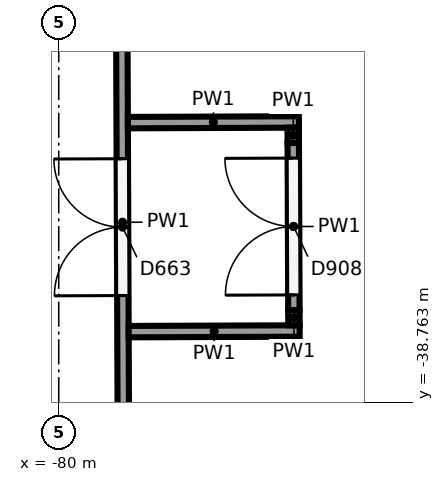
"""IFC4 building model, lengths in metres.
Left out: names, types, materials, properties, quantities, classifications, styles, units other than length and angle.
Written with IfcOpenShell. Run it as: python <this file> out.ifc"""

import sys

from ifc_helpers import new_model, si_unit, direction, frame, frame_2d, origin, place, context, subcontext, project, spatial, rectangle, extrude, element, fill, save


model = new_model("IFC4")
c1 = context("Model", 3, precision=1e-05, world=origin(), true_north=direction((0.0, 1.0)))
c2 = subcontext(c1, "Body", "Model", "MODEL_VIEW")
j1 = project(units=[si_unit("LENGTHUNIT", "METRE"), si_unit("PLANEANGLEUNIT", "RADIAN")], contexts=[c1])
p1 = place(None, origin())
s1 = spatial("IfcSite", under=j1, at=p1, CompositionType="ELEMENT")
p2 = place(p1, origin())
s2 = spatial("IfcBuilding", under=s1, at=p2, CompositionType="ELEMENT")
p3 = place(p2, frame((0.0, 0.0, 6.5)))
s3 = spatial("IfcBuildingStorey", under=s2, at=p3, CompositionType="ELEMENT", Elevation=6.5)
p4 = place(p3, frame((-79.14, -41.81, 0.0), z_axis=(0.0, 0.0, 1.0), x_axis=(-0.003787424647, 0.999992827682, 0.0)))
e1 = element("IfcWall", 1, at=p4, inside=s3, PredefinedType="PARTITIONING", context=c2, shape_type="SweptSolid", body=[
    extrude(rectangle(XDim=10.829, YDim=0.15, at=frame_2d((5.415, 0.0))), origin(), (0.0, 0.0, 1.0), 5.15),
])
p5 = place(p4, frame((4.45, 0.0, 0.0)))
e2 = element("IfcOpeningElement", 2, at=p5, cuts=e1, PredefinedType="OPENING", context=c2, shape_type="SweptSolid", body=[
    extrude(rectangle(XDim=1.8, YDim=2.1, at=frame_2d((0.9, 1.05))), frame((0.0, 0.085, 0.0), z_axis=(0.0, -1.0, 0.0), x_axis=(1.0, 0.0, 0.0)), (0.0, 0.0, 1.0), 0.17),
])
for number, where, z_axis, x_axis in (
    (3, (-79.08, -37.835, 0.0), (0.0, 0.0, 1.0), (1.0, 0.004, 0.0)),
    (4, (-79.09, -35.085, 0.0), (0.0, 0.0, 1.0), (1.0, 0.004, 0.0)),
):
    element("IfcWall", number, at=place(p3, frame(where, z_axis=z_axis, x_axis=x_axis)), inside=s3, PredefinedType="PARTITIONING", context=c2, shape_type="SweptSolid", body=[
        extrude(rectangle(XDim=2.25, YDim=0.15, at=frame_2d((1.125, 0.0))), origin(), (0.0, 0.0, 1.0), 5.15),
    ])
p6 = place(p3, frame((-76.905, -37.751, 0.0), z_axis=(0.0, 0.0, 1.0), x_axis=(-0.004883946635, 0.999988073462, 0.0)))
e5 = element("IfcWall", 5, at=p6, inside=s3, PredefinedType="PARTITIONING", context=c2, shape_type="SweptSolid", body=[
    extrude(rectangle(XDim=0.2, YDim=0.15, at=frame_2d((0.1, 0.0))), origin(), (0.0, 0.0, 1.0), 5.15),
])
p7 = place(p3, frame((-76.906, -37.552, 0.0), z_axis=(0.0, 0.0, 1.0), x_axis=(-0.003773139272, 0.999992881685, 0.0)))
e6 = element("IfcWall", 6, at=p7, inside=s3, PredefinedType="PARTITIONING", context=c2, shape_type="SweptSolid", body=[
    extrude(rectangle(XDim=2.2, YDim=0.15, at=frame_2d((1.1, 0.0))), origin(), (0.0, 0.0, 1.0), 5.15),
])
p8 = place(p7, frame((0.2, 0.0, 0.0)))
e7 = element("IfcOpeningElement", 7, at=p8, cuts=e6, PredefinedType="OPENING", context=c2, shape_type="SweptSolid", body=[
    extrude(rectangle(XDim=1.8, YDim=2.1, at=frame_2d((0.9, 1.05))), frame((0.0, 0.085, 0.0), z_axis=(0.0, -1.0, 0.0), x_axis=(1.0, 0.0, 0.0)), (0.0, 0.0, 1.0), 0.17),
])
p9 = place(p3, frame((-76.914, -35.352, 0.0), z_axis=(0.0, 0.0, 1.0), x_axis=(-0.003662979089, 0.99999329127, 0.0)))
e8 = element("IfcWall", 8, at=p9, inside=s3, PredefinedType="PARTITIONING", context=c2, shape_type="SweptSolid", body=[
    extrude(rectangle(XDim=0.2, YDim=0.15, at=frame_2d((0.1, 0.0))), origin(), (0.0, 0.0, 1.0), 5.15),
])
p10 = place(p5, origin())
e9 = element("IfcDoor", 9, at=p10, inside=s3, OperationType="DOUBLE_DOOR_SINGLE_SWING", PredefinedType="DOOR", context=c2, shape_type="SweptSolid", body=[
    extrude(rectangle(XDim=1.8, YDim=2.1, at=frame_2d((0.9, 1.05))), frame((0.0, 0.025, 0.0), z_axis=(0.0, -1.0, 0.0), x_axis=(1.0, 0.0, 0.0)), (0.0, 0.0, 1.0), 0.05),
])
fill(e2, e9)
p11 = place(p8, origin())
e10 = element("IfcDoor", 10, at=p11, inside=s3, OperationType="DOUBLE_DOOR_SINGLE_SWING", PredefinedType="DOOR", context=c2, shape_type="SweptSolid", body=[
    extrude(rectangle(XDim=1.8, YDim=2.1, at=frame_2d((0.9, 1.05))), frame((0.0, 0.025, 0.0), z_axis=(0.0, -1.0, 0.0), x_axis=(1.0, 0.0, 0.0)), (0.0, 0.0, 1.0), 0.05),
])
fill(e7, e10)
save(model, sys.argv[1])
